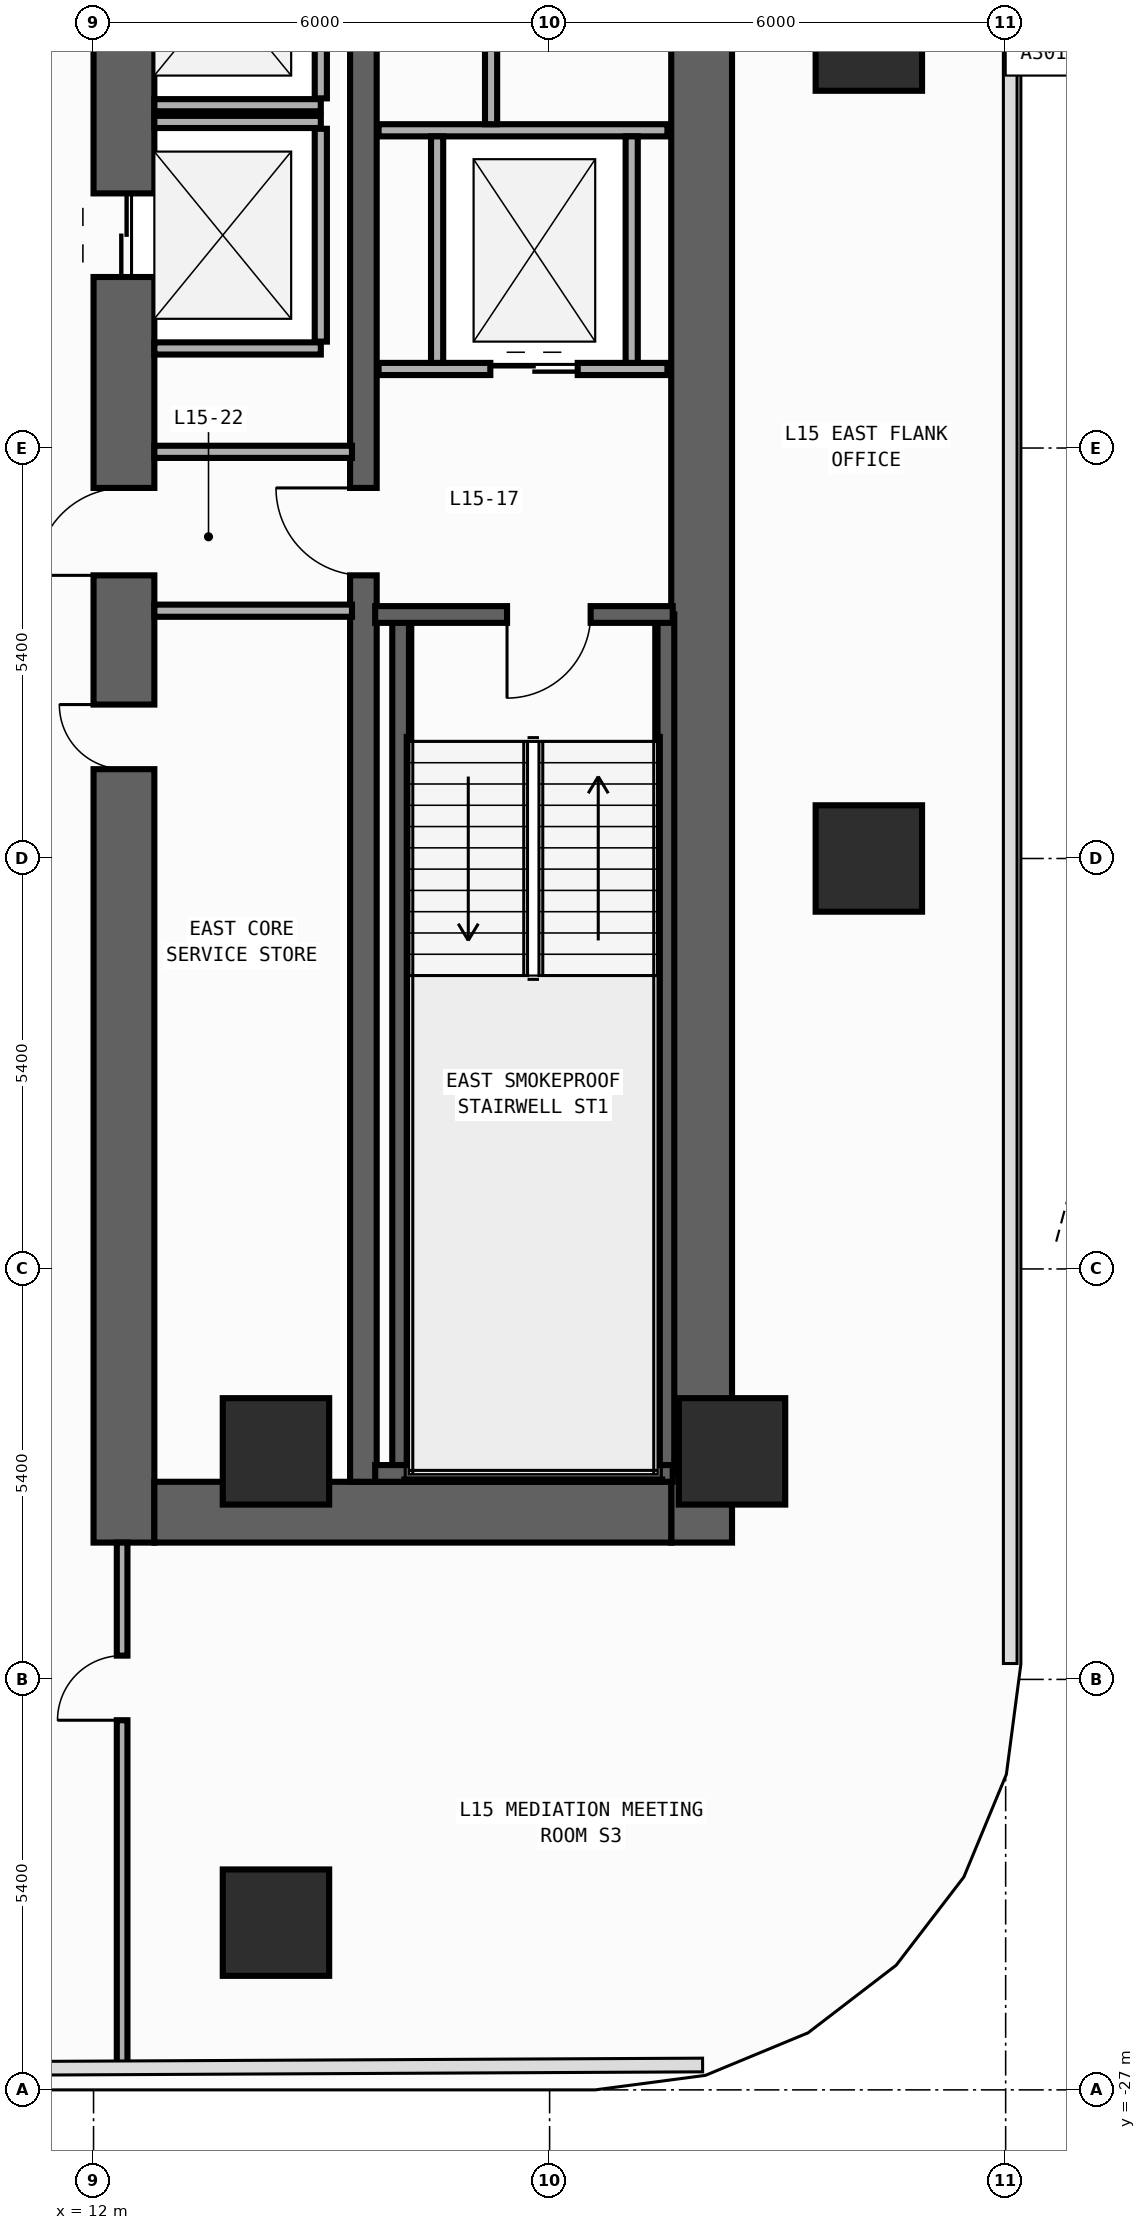
"""IFC4 building model, lengths in metres.
Left out: names, types, materials, properties, quantities, classifications, styles, units other than length and angle.
Written with IfcOpenShell. Run it as: python <this file> out.ifc"""

import sys

from ifc_helpers import new_model, si_unit, direction, frame, frame_2d, origin, origin_2d, place, context, subcontext, project, spatial, rectangle, extrude, element, fill, save


model = new_model("IFC4")
c1 = context("Model", 3, precision=1e-05, world=origin(), true_north=direction((0.0, 1.0)))
c2 = subcontext(c1, "Body", "Model", "MODEL_VIEW")
j1 = project(units=[si_unit("LENGTHUNIT", "METRE"), si_unit("PLANEANGLEUNIT", "RADIAN")], contexts=[c1])
p1 = place(None, origin())
s1 = spatial("IfcSite", under=j1, at=p1, CompositionType="ELEMENT")
p2 = place(p1, origin())
s2 = spatial("IfcBuilding", under=s1, at=p2, CompositionType="ELEMENT")
p3 = place(p2, frame((0.0, 0.0, 63.8)))
s3 = spatial("IfcBuildingStorey", under=s2, at=p3, CompositionType="ELEMENT", Elevation=63.8)
p4 = place(p3, frame((12.4, -19.8, 0.0), z_axis=(0.0, 0.0, 1.0), x_axis=(0.0, 1.0, 0.0)))
e1 = element("IfcWall", 1, at=p4, inside=s3, PredefinedType="SHEAR", context=c2, shape_type="SweptSolid", body=[
    extrude(rectangle(XDim=27.0, YDim=0.8, at=frame_2d((13.5, 0.0))), origin(), (0.0, 0.0, 1.0), 3.94),
])
p5 = place(p4, frame((23.05, 0.0, 0.0)))
e2 = element("IfcOpeningElement", 2, at=p5, cuts=e1, PredefinedType="OPENING", context=c2, shape_type="SweptSolid", body=[
    extrude(rectangle(XDim=1.1, YDim=2.2, at=frame_2d((0.55, 1.1))), frame((0.0, 0.41, 0.0), z_axis=(0.0, -1.0, 0.0), x_axis=(1.0, 0.0, 0.0)), (0.0, 0.0, 1.0), 0.82),
])
p6 = place(p4, frame((19.85, 0.0, 0.0)))
e3 = element("IfcOpeningElement", 3, at=p6, cuts=e1, PredefinedType="OPENING", context=c2, shape_type="SweptSolid", body=[
    extrude(rectangle(XDim=1.1, YDim=2.2, at=frame_2d((0.55, 1.1))), frame((0.0, 0.41, 0.0), z_axis=(0.0, -1.0, 0.0), x_axis=(1.0, 0.0, 0.0)), (0.0, 0.0, 1.0), 0.82),
])
p7 = place(p4, frame((16.65, 0.0, 0.0)))
e4 = element("IfcOpeningElement", 4, at=p7, cuts=e1, PredefinedType="OPENING", context=c2, shape_type="SweptSolid", body=[
    extrude(rectangle(XDim=1.1, YDim=2.2, at=frame_2d((0.55, 1.1))), frame((0.0, 0.41, 0.0), z_axis=(0.0, -1.0, 0.0), x_axis=(1.0, 0.0, 0.0)), (0.0, 0.0, 1.0), 0.82),
])
p8 = place(p4, frame((10.175, 0.0, 0.0)))
e5 = element("IfcOpeningElement", 5, at=p8, cuts=e1, PredefinedType="OPENING", context=c2, shape_type="SweptSolid", body=[
    extrude(rectangle(XDim=0.85, YDim=2.1, at=frame_2d((0.425, 1.05))), frame((0.0, 0.41, 0.0), z_axis=(0.0, -1.0, 0.0), x_axis=(1.0, 0.0, 0.0)), (0.0, 0.0, 1.0), 0.82),
])
p9 = place(p4, frame((12.725, 0.0, 0.0)))
e6 = element("IfcOpeningElement", 6, at=p9, cuts=e1, PredefinedType="OPENING", context=c2, shape_type="SweptSolid", body=[
    extrude(rectangle(XDim=1.15, YDim=2.2, at=frame_2d((0.575, 1.1))), frame((0.0, 0.41, 0.0), z_axis=(0.0, -1.0, 0.0), x_axis=(1.0, 0.0, 0.0)), (0.0, 0.0, 1.0), 0.82),
])
p10 = place(p4, frame((25.125, 0.0, 0.0)))
e7 = element("IfcOpeningElement", 7, at=p10, cuts=e1, PredefinedType="OPENING", context=c2, shape_type="SweptSolid", body=[
    extrude(rectangle(XDim=0.85, YDim=2.1, at=frame_2d((0.425, 1.05))), frame((0.0, 0.41, 0.0), z_axis=(0.0, -1.0, 0.0), x_axis=(1.0, 0.0, 0.0)), (0.0, 0.0, 1.0), 0.82),
])
p11 = place(p3, frame((20.0, -19.8, 0.0), z_axis=(0.0, 0.0, 1.0), x_axis=(0.0, 1.0, 0.0)))
e8 = element("IfcWall", 8, at=p11, inside=s3, PredefinedType="SHEAR", context=c2, shape_type="SweptSolid", body=[
    extrude(rectangle(XDim=27.0, YDim=0.8, at=frame_2d((13.5, 0.0))), origin(), (0.0, 0.0, 1.0), 3.94),
])
p12 = place(p3, frame((12.8, -19.4, 0.0), z_axis=(0.0, 0.0, 1.0), x_axis=(1.0, 0.0, 0.0)))
e9 = element("IfcWall", 9, at=p12, inside=s3, PredefinedType="SHEAR", context=c2, shape_type="SweptSolid", body=[
    extrude(rectangle(XDim=6.8, YDim=0.8, at=frame_2d((3.4, 0.0))), origin(), (0.0, 0.0, 1.0), 3.94),
])
p13 = place(p3, frame((15.55, -19.0, 0.0), z_axis=(0.0, 0.0, 1.0), x_axis=(0.0, 1.0, 0.0)))
e10 = element("IfcWall", 10, at=p13, inside=s3, PredefinedType="SHEAR", context=c2, shape_type="SweptSolid", body=[
    extrude(rectangle(XDim=25.4, YDim=0.35, at=frame_2d((12.7, 0.0))), origin(), (0.0, 0.0, 1.0), 3.94),
])
p14 = place(p13, frame((11.925, 0.0, 0.0)))
e11 = element("IfcOpeningElement", 11, at=p14, cuts=e10, PredefinedType="OPENING", context=c2, shape_type="SweptSolid", body=[
    extrude(rectangle(XDim=1.15, YDim=2.2, at=frame_2d((0.575, 1.1))), frame((0.0, 0.185, 0.0), z_axis=(0.0, -1.0, 0.0), x_axis=(1.0, 0.0, 0.0)), (0.0, 0.0, 1.0), 0.37),
])
p15 = place(p13, frame((24.325, 0.0, 0.0)))
e12 = element("IfcOpeningElement", 12, at=p15, cuts=e10, PredefinedType="OPENING", context=c2, shape_type="SweptSolid", body=[
    extrude(rectangle(XDim=0.85, YDim=2.1, at=frame_2d((0.425, 1.05))), frame((0.0, 0.185, 0.0), z_axis=(0.0, -1.0, 0.0), x_axis=(1.0, 0.0, 0.0)), (0.0, 0.0, 1.0), 0.37),
])
for number, where, z_axis, x_axis in (
    (13, (16.04, -18.89, 0.0), (0.0, 0.0, 1.0), (0.0, 1.0, 0.0)),
    (14, (19.53, -18.89, 0.0), (0.0, 0.0, 1.0), (0.0, 1.0, 0.0)),
):
    element("IfcWall", number, at=place(p3, frame(where, z_axis=z_axis, x_axis=x_axis)), inside=s3, PredefinedType="SHEAR", context=c2, shape_type="SweptSolid", body=[
        extrude(rectangle(XDim=11.3, YDim=0.22, at=frame_2d((5.65, 0.0))), origin(), (0.0, 0.0, 1.0), 3.94),
    ])
p16 = place(p3, frame((15.705, -18.89, 0.0), z_axis=(0.0, 0.0, 1.0), x_axis=(1.0, 0.0, 0.0)))
e15 = element("IfcWall", 15, at=p16, inside=s3, PredefinedType="SHEAR", context=c2, shape_type="SweptSolid", body=[
    extrude(rectangle(XDim=3.915, YDim=0.22, at=frame_2d((1.958, 0.0))), origin(), (0.0, 0.0, 1.0), 3.94),
])
p17 = place(p3, frame((19.62, -7.59, 0.0), z_axis=(0.0, 0.0, 1.0), x_axis=(-1.0, 0.0, 0.0)))
e16 = element("IfcWall", 16, at=p17, inside=s3, PredefinedType="SHEAR", context=c2, shape_type="SweptSolid", body=[
    extrude(rectangle(XDim=3.915, YDim=0.22, at=frame_2d((1.958, 0.0))), origin(), (0.0, 0.0, 1.0), 3.94),
])
p18 = place(p17, frame((1.08, 0.0, 0.0)))
e17 = element("IfcOpeningElement", 17, at=p18, cuts=e16, PredefinedType="OPENING", context=c2, shape_type="SweptSolid", body=[
    extrude(rectangle(XDim=1.1, YDim=2.2, at=frame_2d((0.55, 1.1))), frame((0.0, 0.12, 0.0), z_axis=(0.0, -1.0, 0.0), x_axis=(1.0, 0.0, 0.0)), (0.0, 0.0, 1.0), 0.24),
])
for number, where, z_axis, x_axis in (
    (18, (20.4, -18.6, 0.0), (0.0, 0.0, 1.0), (1.0, 0.0, 0.0)),
    (19, (14.4, -18.6, 0.0), (0.0, 0.0, 1.0), (1.0, 0.0, 0.0)),
    (20, (22.2, -10.8, 0.0), (0.0, 0.0, 1.0), (1.0, 0.0, 0.0)),
    (21, (22.2, 0.0, 0.0), (0.0, 0.0, 1.0), (1.0, 0.0, 0.0)),
    (22, (14.4, -24.8, 0.0), (0.0, 0.0, 1.0), (1.0, 0.0, 0.0)),
):
    element("IfcColumn", number, at=place(p3, frame(where, z_axis=z_axis, x_axis=x_axis)), inside=s3, PredefinedType="COLUMN", context=c2, shape_type="SweptSolid", body=[
        extrude(rectangle(XDim=1.4, YDim=1.4, at=origin_2d()), origin(), (0.0, 0.0, 1.0), 4.2),
    ])
p19 = place(p3, frame((12.8, -0.89, 0.0), z_axis=(0.0, 0.0, 1.0), x_axis=(1.0, 0.0, 0.0)))
e23 = element("IfcWall", 23, at=p19, inside=s3, PredefinedType="STANDARD", context=c2, shape_type="SweptSolid", body=[
    extrude(rectangle(XDim=2.19, YDim=0.16, at=frame_2d((1.095, 0.0))), origin(), (0.0, 0.0, 1.0), 3.94),
])
p20 = place(p3, frame((14.99, -0.8, 0.0), z_axis=(0.0, 0.0, 1.0), x_axis=(0.0, 1.0, 0.0)))
e24 = element("IfcWall", 24, at=p20, inside=s3, PredefinedType="STANDARD", context=c2, shape_type="SweptSolid", body=[
    extrude(rectangle(XDim=2.8, YDim=0.16, at=frame_2d((1.4, 0.0))), origin(), (0.0, 0.0, 1.0), 3.94),
])
for number, where, z_axis, x_axis in (
    (25, (12.8, -4.09, 0.0), (0.0, 0.0, 1.0), (1.0, 0.0, 0.0)),
    (26, (12.8, -1.11, 0.0), (0.0, 0.0, 1.0), (1.0, 0.0, 0.0)),
):
    element("IfcWall", number, at=place(p3, frame(where, z_axis=z_axis, x_axis=x_axis)), inside=s3, PredefinedType="STANDARD", context=c2, shape_type="SweptSolid", body=[
        extrude(rectangle(XDim=2.19, YDim=0.16, at=frame_2d((1.095, 0.0))), origin(), (0.0, 0.0, 1.0), 3.94),
    ])
p21 = place(p3, frame((14.99, -4.0, 0.0), z_axis=(0.0, 0.0, 1.0), x_axis=(0.0, 1.0, 0.0)))
e27 = element("IfcWall", 27, at=p21, inside=s3, PredefinedType="STANDARD", context=c2, shape_type="SweptSolid", body=[
    extrude(rectangle(XDim=2.8, YDim=0.16, at=frame_2d((1.4, 0.0))), origin(), (0.0, 0.0, 1.0), 3.94),
])
p22 = place(p3, frame((15.75, -4.36, 0.0), z_axis=(0.0, 0.0, 1.0), x_axis=(1.0, 0.0, 0.0)))
e28 = element("IfcWall", 28, at=p22, inside=s3, PredefinedType="STANDARD", context=c2, shape_type="SweptSolid", body=[
    extrude(rectangle(XDim=3.8, YDim=0.16, at=frame_2d((1.9, 0.0))), origin(), (0.0, 0.0, 1.0), 3.94),
])
p23 = place(p22, frame((1.47, 0.0, 0.0)))
e29 = element("IfcOpeningElement", 29, at=p23, cuts=e28, PredefinedType="OPENING", context=c2, shape_type="SweptSolid", body=[
    extrude(rectangle(XDim=1.15, YDim=2.2, at=frame_2d((0.575, 1.1))), frame((0.0, 0.09, 0.0), z_axis=(0.0, -1.0, 0.0), x_axis=(1.0, 0.0, 0.0)), (0.0, 0.0, 1.0), 0.18),
])
p24 = place(p3, frame((15.75, -1.22, 0.0), z_axis=(0.0, 0.0, 1.0), x_axis=(1.0, 0.0, 0.0)))
e30 = element("IfcWall", 30, at=p24, inside=s3, PredefinedType="STANDARD", context=c2, shape_type="SweptSolid", body=[
    extrude(rectangle(XDim=3.8, YDim=0.16, at=frame_2d((1.9, 0.0))), origin(), (0.0, 0.0, 1.0), 3.94),
])
for number, where, z_axis, x_axis in (
    (31, (16.52, -4.28, 0.0), (0.0, 0.0, 1.0), (0.0, 1.0, 0.0)),
    (32, (19.08, -4.28, 0.0), (0.0, 0.0, 1.0), (0.0, 1.0, 0.0)),
):
    element("IfcWall", number, at=place(p3, frame(where, z_axis=z_axis, x_axis=x_axis)), inside=s3, PredefinedType="STANDARD", context=c2, shape_type="SweptSolid", body=[
        extrude(rectangle(XDim=2.98, YDim=0.16, at=frame_2d((1.49, 0.0))), origin(), (0.0, 0.0, 1.0), 3.94),
    ])
for number, where, z_axis, x_axis in (
    (33, (12.8, -5.45, 0.0), (0.0, 0.0, 1.0), (1.0, 0.0, 0.0)),
    (34, (12.8, -7.54, 0.0), (0.0, 0.0, 1.0), (1.0, 0.0, 0.0)),
):
    element("IfcWall", number, at=place(p3, frame(where, z_axis=z_axis, x_axis=x_axis)), inside=s3, PredefinedType="STANDARD", context=c2, shape_type="SweptSolid", body=[
        extrude(rectangle(XDim=2.6, YDim=0.16, at=frame_2d((1.3, 0.0))), origin(), (0.0, 0.0, 1.0), 3.94),
    ])
p25 = place(p3, frame((17.23, -1.14, 0.0), z_axis=(0.0, 0.0, 1.0), x_axis=(0.0, 1.0, 0.0)))
e35 = element("IfcWall", 35, at=p25, inside=s3, PredefinedType="PARTITIONING", context=c2, shape_type="SweptSolid", body=[
    extrude(rectangle(XDim=5.31, YDim=0.16, at=frame_2d((2.655, 0.0))), origin(), (0.0, 0.0, 1.0), 3.94),
])
p26 = place(p25, frame((3.375, 0.0, 0.0)))
e36 = element("IfcOpeningElement", 36, at=p26, cuts=e35, PredefinedType="OPENING", context=c2, shape_type="SweptSolid", body=[
    extrude(rectangle(XDim=0.85, YDim=2.1, at=frame_2d((0.425, 1.05))), frame((0.0, 0.09, 0.0), z_axis=(0.0, -1.0, 0.0), x_axis=(1.0, 0.0, 0.0)), (0.0, 0.0, 1.0), 0.18),
])
p27 = place(p3, frame((12.376, -26.705, 0.0), z_axis=(0.0, 0.0, 1.0), x_axis=(0.0, 1.0, 0.0)))
e37 = element("IfcWall", 37, at=p27, inside=s3, PredefinedType="PARTITIONING", context=c2, shape_type="SweptSolid", body=[
    extrude(rectangle(XDim=6.905, YDim=0.14, at=frame_2d((3.452, 0.0))), origin(), (0.0, 0.0, 1.0), 3.94),
])
p28 = place(p27, frame((4.568, 0.0, 0.0)))
e38 = element("IfcOpeningElement", 38, at=p28, cuts=e37, PredefinedType="OPENING", context=c2, shape_type="SweptSolid", body=[
    extrude(rectangle(XDim=0.85, YDim=2.1, at=frame_2d((0.425, 1.05))), frame((0.0, 0.08, 0.0), z_axis=(0.0, -1.0, 0.0), x_axis=(1.0, 0.0, 0.0)), (0.0, 0.0, 1.0), 0.16),
])
p29 = place(p18, origin())
e39 = element("IfcDoor", 39, at=p29, inside=s3, OperationType="SINGLE_SWING_RIGHT", PredefinedType="DOOR", context=c2, shape_type="SweptSolid", body=[
    extrude(rectangle(XDim=1.1, YDim=2.2, at=frame_2d((0.55, 1.1))), frame((0.0, 0.025, 0.0), z_axis=(0.0, -1.0, 0.0), x_axis=(1.0, 0.0, 0.0)), (0.0, 0.0, 1.0), 0.05),
])
fill(e17, e39)
p30 = place(p7, origin())
e40 = element("IfcDoor", 40, at=p30, inside=s3, OperationType="DOUBLE_DOOR_SLIDING", PredefinedType="DOOR", context=c2, shape_type="SweptSolid", body=[
    extrude(rectangle(XDim=1.1, YDim=2.2, at=frame_2d((0.55, 1.1))), frame((0.0, 0.025, 0.0), z_axis=(0.0, -1.0, 0.0), x_axis=(1.0, 0.0, 0.0)), (0.0, 0.0, 1.0), 0.05),
])
fill(e4, e40)
p31 = place(p8, origin())
e41 = element("IfcDoor", 41, at=p31, inside=s3, OperationType="SINGLE_SWING_RIGHT", PredefinedType="DOOR", context=c2, shape_type="SweptSolid", body=[
    extrude(rectangle(XDim=0.85, YDim=2.1, at=frame_2d((0.425, 1.05))), frame((0.0, 0.025, 0.0), z_axis=(0.0, -1.0, 0.0), x_axis=(1.0, 0.0, 0.0)), (0.0, 0.0, 1.0), 0.05),
])
fill(e5, e41)
p32 = place(p9, origin())
e42 = element("IfcDoor", 42, at=p32, inside=s3, OperationType="SINGLE_SWING_LEFT", PredefinedType="DOOR", context=c2, shape_type="SweptSolid", body=[
    extrude(rectangle(XDim=1.15, YDim=2.2, at=frame_2d((0.575, 1.1))), frame((0.0, 0.025, 0.0), z_axis=(0.0, -1.0, 0.0), x_axis=(1.0, 0.0, 0.0)), (0.0, 0.0, 1.0), 0.05),
])
fill(e6, e42)
p33 = place(p14, origin())
e43 = element("IfcDoor", 43, at=p33, inside=s3, OperationType="SINGLE_SWING_RIGHT", PredefinedType="DOOR", context=c2, shape_type="SweptSolid", body=[
    extrude(rectangle(XDim=1.15, YDim=2.2, at=frame_2d((0.575, 1.1))), frame((0.0, 0.025, 0.0), z_axis=(0.0, -1.0, 0.0), x_axis=(1.0, 0.0, 0.0)), (0.0, 0.0, 1.0), 0.05),
])
fill(e11, e43)
p34 = place(p23, origin())
e44 = element("IfcDoor", 44, at=p34, inside=s3, OperationType="DOUBLE_DOOR_SLIDING", PredefinedType="DOOR", context=c2, shape_type="SweptSolid", body=[
    extrude(rectangle(XDim=1.15, YDim=2.2, at=frame_2d((0.575, 1.1))), frame((0.0, 0.025, 0.0), z_axis=(0.0, -1.0, 0.0), x_axis=(1.0, 0.0, 0.0)), (0.0, 0.0, 1.0), 0.05),
])
fill(e29, e44)
p35 = place(p28, origin())
e45 = element("IfcDoor", 45, at=p35, inside=s3, OperationType="SINGLE_SWING_LEFT", PredefinedType="DOOR", context=c2, shape_type="SweptSolid", body=[
    extrude(rectangle(XDim=0.85, YDim=2.1, at=frame_2d((0.425, 1.05))), frame((0.0, 0.025, 0.0), z_axis=(0.0, -1.0, 0.0), x_axis=(1.0, 0.0, 0.0)), (0.0, 0.0, 1.0), 0.05),
])
fill(e38, e45)
save(model, sys.argv[1])
